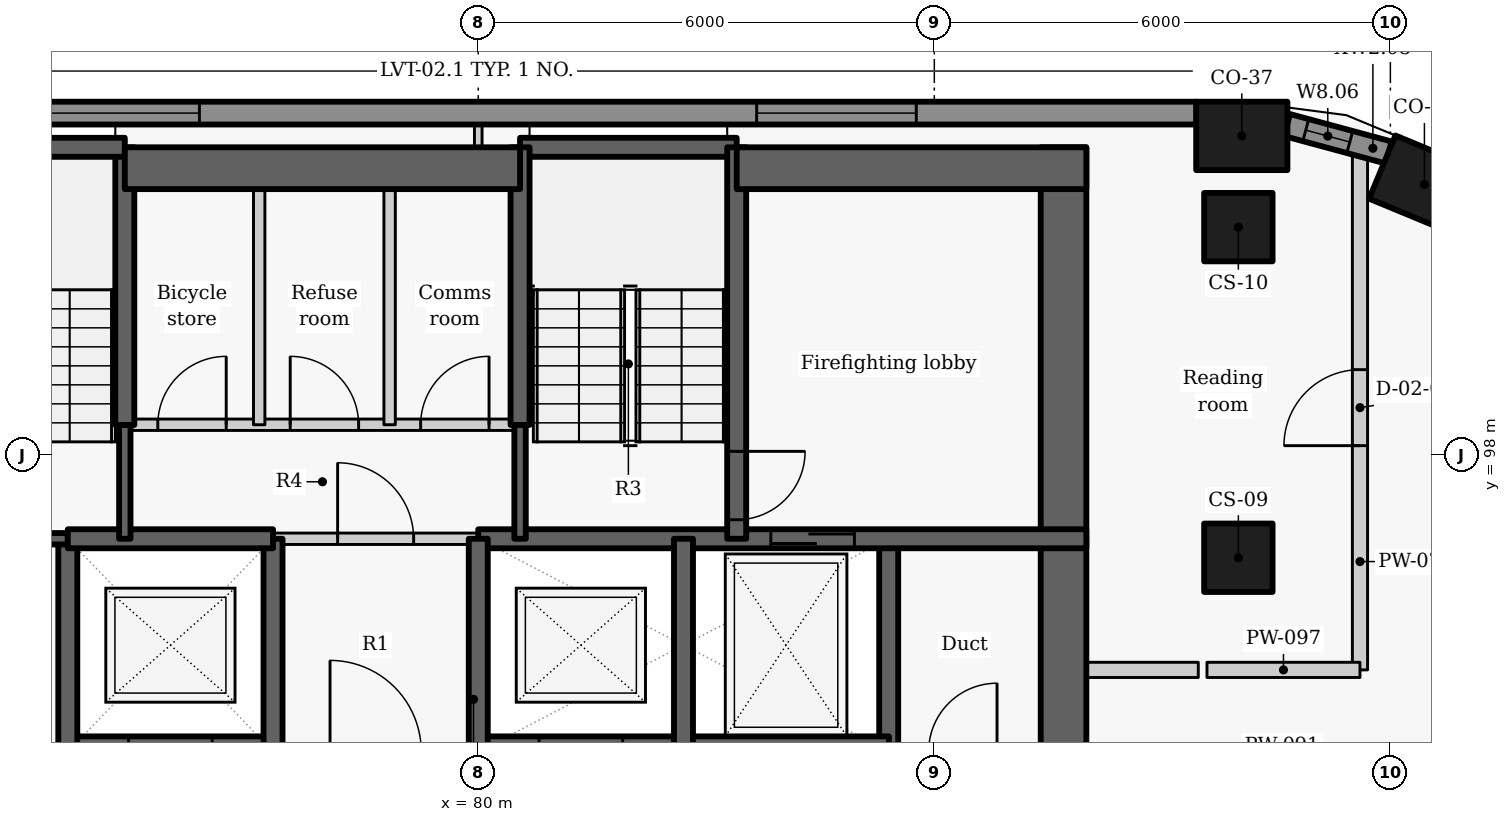
"""IFC4 building model, lengths in metres.
Left out: names, types, materials, properties, quantities, classifications, styles, units other than length and angle.
Written with IfcOpenShell. Run it as: python <this file> out.ifc"""

import sys

from ifc_helpers import new_model, si_unit, direction, frame, frame_2d, origin, origin_2d, place, context, subcontext, project, spatial, rectangle, extrude, element, fill, save


model = new_model("IFC4")
c1 = context("Model", 3, precision=1e-05, world=origin(), true_north=direction((0.0, 1.0)))
c2 = subcontext(c1, "Body", "Model", "MODEL_VIEW")
j1 = project(units=[si_unit("LENGTHUNIT", "METRE"), si_unit("PLANEANGLEUNIT", "RADIAN")], contexts=[c1])
p1 = place(None, origin())
s1 = spatial("IfcSite", under=j1, at=p1, CompositionType="ELEMENT")
p2 = place(p1, origin())
s2 = spatial("IfcBuilding", under=s1, at=p2, CompositionType="ELEMENT")
p3 = place(p2, frame((0.0, 0.0, 176.7)))
s3 = spatial("IfcBuildingStorey", under=s2, at=p3, CompositionType="ELEMENT", Elevation=176.7)
for number, where, z_axis, x_axis in (
    (1, (92.448, 101.56, 0.0), (0.0, 0.0, 1.0), (-0.924, 0.383, 0.0)),
    (2, (90.045, 102.2, 0.0), (0.0, 0.0, 1.0), (-1.0, 0.0, 0.0)),
):
    element("IfcColumn", number, at=place(p3, frame(where, z_axis=z_axis, x_axis=x_axis)), inside=s3, PredefinedType="COLUMN", context=c2, shape_type="SweptSolid", body=[
        extrude(rectangle(XDim=1.2, YDim=0.9, at=origin_2d()), origin(), (0.0, 0.0, 1.0), 3.3),
    ])
for number, where, z_axis, x_axis in (
    (3, (90.0, 96.65, 0.0), (0.0, 0.0, 1.0), (0.0, 1.0, 0.0)),
    (4, (90.0, 101.0, 0.0), (0.0, 0.0, 1.0), (0.0, 1.0, 0.0)),
):
    element("IfcColumn", number, at=place(p3, frame(where, z_axis=z_axis, x_axis=x_axis)), inside=s3, PredefinedType="COLUMN", context=c2, shape_type="SweptSolid", body=[
        extrude(rectangle(XDim=0.9, YDim=0.9, at=origin_2d()), origin(), (0.0, 0.0, 1.0), 3.3),
    ])
p4 = place(p3, frame((91.977, 101.981, 0.0), z_axis=(0.0, 0.0, 1.0), x_axis=(-0.965315341278, 0.261086751661, 0.0)))
e5 = element("IfcWall", 5, at=p4, inside=s3, PredefinedType="SOLIDWALL", context=c2, shape_type="SweptSolid", body=[
    extrude(rectangle(XDim=1.384, YDim=0.3, at=frame_2d((0.692, 0.0))), origin(), (0.0, 0.0, 1.0), 2.425),
])
p5 = place(p4, frame((0.529, 0.0, 0.9)))
e6 = element("IfcOpeningElement", 6, at=p5, cuts=e5, PredefinedType="OPENING", context=c2, shape_type="SweptSolid", body=[
    extrude(rectangle(XDim=0.6, YDim=1.1, at=frame_2d((0.3, 0.55))), frame((0.0, 0.16, 0.0), z_axis=(0.0, -1.0, 0.0), x_axis=(1.0, 0.0, 0.0)), (0.0, 0.0, 1.0), 0.32),
])
p6 = place(p3, frame((89.449, 102.5, 0.0), z_axis=(0.0, 0.0, 1.0), x_axis=(-1.0, 0.0, 0.0)))
e7 = element("IfcWall", 7, at=p6, inside=s3, PredefinedType="SOLIDWALL", context=c2, shape_type="SweptSolid", body=[
    extrude(rectangle(XDim=18.933, YDim=0.3, at=frame_2d((9.466, 0.0))), origin(), (0.0, 0.0, 1.0), 2.425),
])
p7 = place(p6, frame((3.687, 0.0, 0.9)))
e8 = element("IfcOpeningElement", 8, at=p7, cuts=e7, PredefinedType="OPENING", context=c2, shape_type="SweptSolid", body=[
    extrude(rectangle(XDim=2.1, YDim=1.1, at=frame_2d((1.05, 0.55))), frame((0.0, 0.16, 0.0), z_axis=(0.0, -1.0, 0.0), x_axis=(1.0, 0.0, 0.0)), (0.0, 0.0, 1.0), 0.32),
])
p8 = place(p6, frame((13.118, 0.0, 0.9)))
e9 = element("IfcOpeningElement", 9, at=p8, cuts=e7, PredefinedType="OPENING", context=c2, shape_type="SweptSolid", body=[
    extrude(rectangle(XDim=2.1, YDim=1.1, at=frame_2d((1.05, 0.55))), frame((0.0, 0.16, 0.0), z_axis=(0.0, -1.0, 0.0), x_axis=(1.0, 0.0, 0.0)), (0.0, 0.0, 1.0), 0.32),
])
p9 = place(p3, frame((85.4, 94.1, -0.41), z_axis=(0.0, 0.0, 1.0), x_axis=(0.0, 1.0, 0.0)))
e10 = element("IfcWall", 10, at=p9, inside=s3, PredefinedType="SHEAR", context=c2, shape_type="SweptSolid", body=[
    extrude(rectangle(XDim=2.8, YDim=0.25, at=frame_2d((1.4, 0.0))), origin(), (0.0, 0.0, 1.0), 3.435),
])
p10 = place(p3, frame((87.7, 102.05, -0.41), z_axis=(0.0, 0.0, 1.0), x_axis=(0.0, -1.0, 0.0)))
e11 = element("IfcWall", 11, at=p10, inside=s3, PredefinedType="SHEAR", context=c2, shape_type="SweptSolid", body=[
    extrude(rectangle(XDim=14.25, YDim=0.6, at=frame_2d((7.125, 0.0))), origin(), (0.0, 0.0, 1.0), 3.435),
])
p11 = place(p10, frame((8.898, 0.0, 0.41)))
e12 = element("IfcOpeningElement", 12, at=p11, cuts=e11, PredefinedType="OPENING", context=c2, shape_type="SweptSolid", body=[
    extrude(rectangle(XDim=1.5, YDim=2.1, at=frame_2d((0.75, 1.05))), frame((0.0, 0.31, 0.0), z_axis=(0.0, -1.0, 0.0), x_axis=(1.0, 0.0, 0.0)), (0.0, 0.0, 1.0), 0.62),
])
p12 = place(p3, frame((74.597, 94.1, -0.41), z_axis=(0.0, 0.0, 1.0), x_axis=(1.0, 0.0, 0.0)))
e13 = element("IfcWall", 13, at=p12, inside=s3, PredefinedType="SHEAR", context=c2, shape_type="SweptSolid", body=[
    extrude(rectangle(XDim=2.706, YDim=0.4, at=frame_2d((1.353, 0.0))), origin(), (0.0, 0.0, 1.0), 3.435),
])
p13 = place(p12, frame((0.803, 0.0, 0.41)))
e14 = element("IfcOpeningElement", 14, at=p13, cuts=e13, PredefinedType="OPENING", context=c2, shape_type="SweptSolid", body=[
    extrude(rectangle(XDim=1.1, YDim=2.1, at=frame_2d((0.55, 1.05))), frame((0.0, 0.21, 0.0), z_axis=(0.0, -1.0, 0.0), x_axis=(1.0, 0.0, 0.0)), (0.0, 0.0, 1.0), 0.42),
])
p14 = place(p3, frame((79.997, 94.1, -0.41), z_axis=(0.0, 0.0, 1.0), x_axis=(1.0, 0.0, 0.0)))
e15 = element("IfcWall", 15, at=p14, inside=s3, PredefinedType="SHEAR", context=c2, shape_type="SweptSolid", body=[
    extrude(rectangle(XDim=5.406, YDim=0.4, at=frame_2d((2.703, 0.0))), origin(), (0.0, 0.0, 1.0), 3.435),
])
p15 = place(p14, frame((0.803, 0.0, 0.41)))
e16 = element("IfcOpeningElement", 16, at=p15, cuts=e15, PredefinedType="OPENING", context=c2, shape_type="SweptSolid", body=[
    extrude(rectangle(XDim=1.1, YDim=2.1, at=frame_2d((0.55, 1.05))), frame((0.0, 0.21, 0.0), z_axis=(0.0, -1.0, 0.0), x_axis=(1.0, 0.0, 0.0)), (0.0, 0.0, 1.0), 0.42),
])
p16 = place(p3, frame((74.6, 94.1, -0.41), z_axis=(0.0, 0.0, 1.0), x_axis=(0.0, 1.0, 0.0)))
e17 = element("IfcWall", 17, at=p16, inside=s3, PredefinedType="SHEAR", context=c2, shape_type="SweptSolid", body=[
    extrude(rectangle(XDim=2.8, YDim=0.25, at=frame_2d((1.4, 0.0))), origin(), (0.0, 0.0, 1.0), 3.435),
])
p17 = place(p3, frame((74.6, 96.9, -0.41), z_axis=(0.0, 0.0, 1.0), x_axis=(-1.0, 0.0, 0.0)))
e18 = element("IfcWall", 18, at=p17, inside=s3, PredefinedType="SHEAR", context=c2, shape_type="SweptSolid", body=[
    extrude(rectangle(XDim=2.6, YDim=0.15, at=frame_2d((1.3, 0.0))), origin(), (0.0, 0.0, 1.0), 3.435),
])
p18 = place(p17, frame((0.37, 0.0, 0.41)))
e19 = element("IfcOpeningElement", 19, at=p18, cuts=e18, PredefinedType="OPENING", context=c2, shape_type="SweptSolid", body=[
    extrude(rectangle(XDim=1.1, YDim=2.1, at=frame_2d((0.55, 1.05))), frame((0.0, 0.085, 0.0), z_axis=(0.0, -1.0, 0.0), x_axis=(1.0, 0.0, 0.0)), (0.0, 0.0, 1.0), 0.17),
])
p19 = place(p3, frame((77.3, 94.1, -0.41), z_axis=(0.0, 0.0, 1.0), x_axis=(0.0, 1.0, 0.0)))
e20 = element("IfcWall", 20, at=p19, inside=s3, PredefinedType="SHEAR", context=c2, shape_type="SweptSolid", body=[
    extrude(rectangle(XDim=2.8, YDim=0.25, at=frame_2d((1.4, 0.0))), origin(), (0.0, 0.0, 1.0), 3.435),
])
p20 = place(p3, frame((74.6, 96.9, -0.41), z_axis=(0.0, 0.0, 1.0), x_axis=(1.0, 0.0, 0.0)))
e21 = element("IfcWall", 21, at=p20, inside=s3, PredefinedType="SHEAR", context=c2, shape_type="SweptSolid", body=[
    extrude(rectangle(XDim=2.7, YDim=0.25, at=frame_2d((1.35, 0.0))), origin(), (0.0, 0.0, 1.0), 3.435),
])
p21 = place(p3, frame((80.0, 96.9, -0.41), z_axis=(0.0, 0.0, 1.0), x_axis=(1.0, 0.0, 0.0)))
e22 = element("IfcWall", 22, at=p21, inside=s3, PredefinedType="SHEAR", context=c2, shape_type="SweptSolid", body=[
    extrude(rectangle(XDim=8.0, YDim=0.25, at=frame_2d((4.0, 0.0))), origin(), (0.0, 0.0, 1.0), 3.435),
])
p22 = place(p21, frame((3.849, 0.0, 0.41)))
e23 = element("IfcOpeningElement", 23, at=p22, cuts=e22, PredefinedType="OPENING", context=c2, shape_type="SweptSolid", body=[
    extrude(rectangle(XDim=1.1, YDim=2.1, at=frame_2d((0.55, 1.05))), frame((0.0, 0.135, 0.0), z_axis=(0.0, -1.0, 0.0), x_axis=(1.0, 0.0, 0.0)), (0.0, 0.0, 1.0), 0.27),
])
p23 = place(p3, frame((80.0, 94.1, -0.41), z_axis=(0.0, 0.0, 1.0), x_axis=(0.0, 1.0, 0.0)))
e24 = element("IfcWall", 24, at=p23, inside=s3, PredefinedType="SHEAR", context=c2, shape_type="SweptSolid", body=[
    extrude(rectangle(XDim=2.8, YDim=0.25, at=frame_2d((1.4, 0.0))), origin(), (0.0, 0.0, 1.0), 3.435),
])
p24 = place(p3, frame((77.3, 96.9, 0.0), z_axis=(0.0, 0.0, 1.0), x_axis=(1.0, 0.0, 0.0)))
e25 = element("IfcWall", 25, at=p24, inside=s3, PredefinedType="PARTITIONING", context=c2, shape_type="SweptSolid", body=[
    extrude(rectangle(XDim=2.7, YDim=0.15, at=frame_2d((1.35, 0.0))), origin(), (0.0, 0.0, 1.0), 3.025),
])
p25 = place(p24, frame((0.85, 0.0, 0.0)))
e26 = element("IfcOpeningElement", 26, at=p25, cuts=e25, PredefinedType="OPENING", context=c2, shape_type="SweptSolid", body=[
    extrude(rectangle(XDim=1.0, YDim=2.1, at=frame_2d((0.5, 1.05))), frame((0.0, 0.085, 0.0), z_axis=(0.0, -1.0, 0.0), x_axis=(1.0, 0.0, 0.0)), (0.0, 0.0, 1.0), 0.17),
])
p26 = place(p3, frame((82.7, 94.1, -0.41), z_axis=(0.0, 0.0, 1.0), x_axis=(0.0, 1.0, 0.0)))
e27 = element("IfcWall", 27, at=p26, inside=s3, PredefinedType="SHEAR", context=c2, shape_type="SweptSolid", body=[
    extrude(rectangle(XDim=2.8, YDim=0.25, at=frame_2d((1.4, 0.0))), origin(), (0.0, 0.0, 1.0), 3.435),
])
p27 = place(p3, frame((75.35, 96.9, -0.41), z_axis=(0.0, 0.0, 1.0), x_axis=(0.0, 1.0, 0.0)))
e28 = element("IfcWall", 28, at=p27, inside=s3, PredefinedType="SHEAR", context=c2, shape_type="SweptSolid", body=[
    extrude(rectangle(XDim=1.503, YDim=0.15, at=frame_2d((0.751, 0.0))), origin(), (0.0, 0.0, 1.0), 3.435),
])
p28 = place(p3, frame((75.35, 98.397, -0.41), z_axis=(0.0, 0.0, 1.0), x_axis=(0.0, 1.0, 0.0)))
e29 = element("IfcWall", 29, at=p28, inside=s3, PredefinedType="SHEAR", context=c2, shape_type="SweptSolid", body=[
    extrude(rectangle(XDim=3.653, YDim=0.25, at=frame_2d((1.827, 0.0))), origin(), (0.0, 0.0, 1.0), 3.435),
])
p29 = place(p3, frame((72.0, 102.05, 0.0), z_axis=(0.0, 0.0, 1.0), x_axis=(1.0, 0.0, 0.0)))
e30 = element("IfcWall", 30, at=p29, inside=s3, PredefinedType="SHEAR", context=c2, shape_type="SweptSolid", body=[
    extrude(rectangle(XDim=3.35, YDim=0.25, at=frame_2d((1.675, 0.0))), origin(), (0.0, 0.0, 1.0), 3.025),
])
p30 = place(p3, frame((80.55, 102.05, 0.0), z_axis=(0.0, 0.0, 1.0), x_axis=(1.0, 0.0, 0.0)))
e31 = element("IfcWall", 31, at=p30, inside=s3, PredefinedType="SHEAR", context=c2, shape_type="SweptSolid", body=[
    extrude(rectangle(XDim=2.85, YDim=0.25, at=frame_2d((1.425, 0.0))), origin(), (0.0, 0.0, 1.0), 3.025),
])
p31 = place(p3, frame((83.4, 102.05, -0.41), z_axis=(0.0, 0.0, 1.0), x_axis=(0.0, -1.0, 0.0)))
e32 = element("IfcWall", 32, at=p31, inside=s3, PredefinedType="SHEAR", context=c2, shape_type="SweptSolid", body=[
    extrude(rectangle(XDim=5.15, YDim=0.25, at=frame_2d((2.575, 0.0))), origin(), (0.0, 0.0, 1.0), 3.435),
])
p32 = place(p31, frame((4.0, 0.0, 0.41)))
e33 = element("IfcOpeningElement", 33, at=p32, cuts=e32, PredefinedType="OPENING", context=c2, shape_type="SweptSolid", body=[
    extrude(rectangle(XDim=0.9, YDim=2.1, at=frame_2d((0.45, 1.05))), frame((0.0, 0.135, 0.0), z_axis=(0.0, -1.0, 0.0), x_axis=(1.0, 0.0, 0.0)), (0.0, 0.0, 1.0), 0.27),
])
p33 = place(p3, frame((80.55, 96.9, -0.41), z_axis=(0.0, 0.0, 1.0), x_axis=(0.0, 1.0, 0.0)))
e34 = element("IfcWall", 34, at=p33, inside=s3, PredefinedType="SHEAR", context=c2, shape_type="SweptSolid", body=[
    extrude(rectangle(XDim=1.503, YDim=0.15, at=frame_2d((0.751, 0.0))), origin(), (0.0, 0.0, 1.0), 3.435),
])
p34 = place(p3, frame((80.55, 98.397, -0.41), z_axis=(0.0, 0.0, 1.0), x_axis=(0.0, 1.0, 0.0)))
e35 = element("IfcWall", 35, at=p34, inside=s3, PredefinedType="SHEAR", context=c2, shape_type="SweptSolid", body=[
    extrude(rectangle(XDim=3.653, YDim=0.25, at=frame_2d((1.827, 0.0))), origin(), (0.0, 0.0, 1.0), 3.435),
])
p35 = place(p3, frame((75.35, 101.775, 0.0), z_axis=(0.0, 0.0, 1.0), x_axis=(1.0, 0.0, 0.0)))
e36 = element("IfcWall", 36, at=p35, inside=s3, PredefinedType="SHEAR", context=c2, shape_type="SweptSolid", body=[
    extrude(rectangle(XDim=5.2, YDim=0.55, at=frame_2d((2.6, 0.0))), origin(), (0.0, 0.0, 1.0), 3.025),
])
p36 = place(p3, frame((83.4, 101.775, 0.0), z_axis=(0.0, 0.0, 1.0), x_axis=(1.0, 0.0, 0.0)))
e37 = element("IfcWall", 37, at=p36, inside=s3, PredefinedType="SHEAR", context=c2, shape_type="SweptSolid", body=[
    extrude(rectangle(XDim=4.6, YDim=0.55, at=frame_2d((2.3, 0.0))), origin(), (0.0, 0.0, 1.0), 3.025),
])
p37 = place(p3, frame((75.35, 98.4, 0.0), z_axis=(0.0, 0.0, 1.0), x_axis=(1.0, 0.0, 0.0)))
e38 = element("IfcWall", 38, at=p37, inside=s3, PredefinedType="PARTITIONING", context=c2, shape_type="SweptSolid", body=[
    extrude(rectangle(XDim=5.2, YDim=0.15, at=frame_2d((2.6, 0.0))), origin(), (0.0, 0.0, 1.0), 3.025),
])
p38 = place(p37, frame((0.434, 0.0, 0.0)))
e39 = element("IfcOpeningElement", 39, at=p38, cuts=e38, PredefinedType="OPENING", context=c2, shape_type="SweptSolid", body=[
    extrude(rectangle(XDim=0.9, YDim=2.1, at=frame_2d((0.45, 1.05))), frame((0.0, 0.085, 0.0), z_axis=(0.0, -1.0, 0.0), x_axis=(1.0, 0.0, 0.0)), (0.0, 0.0, 1.0), 0.17),
])
p39 = place(p37, frame((2.176, 0.0, 0.0)))
e40 = element("IfcOpeningElement", 40, at=p39, cuts=e38, PredefinedType="OPENING", context=c2, shape_type="SweptSolid", body=[
    extrude(rectangle(XDim=0.9, YDim=2.1, at=frame_2d((0.45, 1.05))), frame((0.0, 0.085, 0.0), z_axis=(0.0, -1.0, 0.0), x_axis=(1.0, 0.0, 0.0)), (0.0, 0.0, 1.0), 0.17),
])
p40 = place(p37, frame((3.892, 0.0, 0.0)))
e41 = element("IfcOpeningElement", 41, at=p40, cuts=e38, PredefinedType="OPENING", context=c2, shape_type="SweptSolid", body=[
    extrude(rectangle(XDim=0.9, YDim=2.1, at=frame_2d((0.45, 1.05))), frame((0.0, 0.085, 0.0), z_axis=(0.0, -1.0, 0.0), x_axis=(1.0, 0.0, 0.0)), (0.0, 0.0, 1.0), 0.17),
])
for number, where, z_axis, x_axis in (
    (42, (77.118, 98.4, 0.0), (0.0, 0.0, 1.0), (0.0, 1.0, 0.0)),
    (43, (78.834, 98.4, 0.0), (0.0, 0.0, 1.0), (0.0, 1.0, 0.0)),
):
    element("IfcWall", number, at=place(p3, frame(where, z_axis=z_axis, x_axis=x_axis)), inside=s3, PredefinedType="PARTITIONING", context=c2, shape_type="SweptSolid", body=[
        extrude(rectangle(XDim=3.65, YDim=0.15, at=frame_2d((1.825, 0.0))), origin(), (0.0, 0.0, 1.0), 3.025),
    ])
p41 = place(p3, frame((91.6, 95.175, 0.0), z_axis=(0.0, 0.0, 1.0), x_axis=(0.0, 1.0, 0.0)))
e44 = element("IfcWall", 44, at=p41, inside=s3, PredefinedType="PARTITIONING", context=c2, shape_type="SweptSolid", body=[
    extrude(rectangle(XDim=6.899, YDim=0.2, at=frame_2d((3.449, 0.0))), origin(), (0.0, 0.0, 1.0), 2.405),
])
p42 = place(p41, frame((2.95, 0.0, 0.0)))
e45 = element("IfcOpeningElement", 45, at=p42, cuts=e44, PredefinedType="OPENING", context=c2, shape_type="SweptSolid", body=[
    extrude(rectangle(XDim=1.0, YDim=2.1, at=frame_2d((0.5, 1.05))), frame((0.0, 0.11, 0.0), z_axis=(0.0, -1.0, 0.0), x_axis=(1.0, 0.0, 0.0)), (0.0, 0.0, 1.0), 0.22),
])
p43 = place(p3, frame((88.0, 95.175, 0.0), z_axis=(0.0, 0.0, 1.0), x_axis=(1.0, 0.0, 0.0)))
e46 = element("IfcWall", 46, at=p43, inside=s3, PredefinedType="PARTITIONING", context=c2, shape_type="SweptSolid", body=[
    extrude(rectangle(XDim=1.473, YDim=0.2, at=frame_2d((0.736, 0.0))), origin(), (0.0, 0.0, 1.0), 3.025),
])
p44 = place(p3, frame((89.587, 95.175, 0.0), z_axis=(0.0, 0.0, 1.0), x_axis=(1.0, 0.0, 0.0)))
e47 = element("IfcWall", 47, at=p44, inside=s3, PredefinedType="PARTITIONING", context=c2, shape_type="SweptSolid", body=[
    extrude(rectangle(XDim=2.013, YDim=0.2, at=frame_2d((1.006, 0.0))), origin(), (0.0, 0.0, 1.0), 2.505),
])
p45 = place(p3, frame((80.0, 102.05, 0.0), z_axis=(0.0, 0.0, 1.0), x_axis=(0.0, 1.0, 0.0)))
e48 = element("IfcWall", 48, at=p45, inside=s3, PredefinedType="PARTITIONING", context=c2, shape_type="SweptSolid", body=[
    extrude(rectangle(XDim=0.3, YDim=0.1, at=frame_2d((0.15, 0.0))), origin(), (0.0, 0.0, 1.0), 3.025),
])
p46 = place(p5, origin())
e49 = element("IfcWindow", 49, at=p46, inside=s3, PartitioningType="SINGLE_PANEL", PredefinedType="WINDOW", context=c2, shape_type="SweptSolid", body=[
    extrude(rectangle(XDim=0.6, YDim=1.1, at=frame_2d((0.3, 0.55))), frame((0.0, 0.03, 0.0), z_axis=(0.0, -1.0, 0.0), x_axis=(1.0, 0.0, 0.0)), (0.0, 0.0, 1.0), 0.06),
])
fill(e6, e49)
p47 = place(p7, origin())
e50 = element("IfcWindow", 50, at=p47, inside=s3, PartitioningType="SINGLE_PANEL", PredefinedType="WINDOW", context=c2, shape_type="SweptSolid", body=[
    extrude(rectangle(XDim=2.1, YDim=1.1, at=frame_2d((1.05, 0.55))), frame((0.0, 0.03, 0.0), z_axis=(0.0, -1.0, 0.0), x_axis=(1.0, 0.0, 0.0)), (0.0, 0.0, 1.0), 0.06),
])
fill(e8, e50)
p48 = place(p8, origin())
e51 = element("IfcWindow", 51, at=p48, inside=s3, PartitioningType="SINGLE_PANEL", PredefinedType="WINDOW", context=c2, shape_type="SweptSolid", body=[
    extrude(rectangle(XDim=2.1, YDim=1.1, at=frame_2d((1.05, 0.55))), frame((0.0, 0.03, 0.0), z_axis=(0.0, -1.0, 0.0), x_axis=(1.0, 0.0, 0.0)), (0.0, 0.0, 1.0), 0.06),
])
fill(e9, e51)
p49 = place(p22, origin())
e52 = element("IfcDoor", 52, at=p49, inside=s3, OperationType="SLIDING_TO_LEFT", PredefinedType="DOOR", context=c2, shape_type="SweptSolid", body=[
    extrude(rectangle(XDim=1.1, YDim=2.1, at=frame_2d((0.55, 1.05))), frame((0.0, 0.025, 0.0), z_axis=(0.0, -1.0, 0.0), x_axis=(1.0, 0.0, 0.0)), (0.0, 0.0, 1.0), 0.05),
])
fill(e23, e52)
p50 = place(p25, origin())
e53 = element("IfcDoor", 53, at=p50, inside=s3, OperationType="SINGLE_SWING_LEFT", PredefinedType="DOOR", context=c2, shape_type="SweptSolid", body=[
    extrude(rectangle(XDim=1.0, YDim=2.1, at=frame_2d((0.5, 1.05))), frame((0.0, 0.025, 0.0), z_axis=(0.0, -1.0, 0.0), x_axis=(1.0, 0.0, 0.0)), (0.0, 0.0, 1.0), 0.05),
])
fill(e26, e53)
p51 = place(p38, origin())
e54 = element("IfcDoor", 54, at=p51, inside=s3, OperationType="SINGLE_SWING_RIGHT", PredefinedType="DOOR", context=c2, shape_type="SweptSolid", body=[
    extrude(rectangle(XDim=0.9, YDim=2.1, at=frame_2d((0.45, 1.05))), frame((0.0, 0.025, 0.0), z_axis=(0.0, -1.0, 0.0), x_axis=(1.0, 0.0, 0.0)), (0.0, 0.0, 1.0), 0.05),
])
fill(e39, e54)
p52 = place(p39, origin())
e55 = element("IfcDoor", 55, at=p52, inside=s3, OperationType="SINGLE_SWING_LEFT", PredefinedType="DOOR", context=c2, shape_type="SweptSolid", body=[
    extrude(rectangle(XDim=0.9, YDim=2.1, at=frame_2d((0.45, 1.05))), frame((0.0, 0.025, 0.0), z_axis=(0.0, -1.0, 0.0), x_axis=(1.0, 0.0, 0.0)), (0.0, 0.0, 1.0), 0.05),
])
fill(e40, e55)
p53 = place(p40, origin())
e56 = element("IfcDoor", 56, at=p53, inside=s3, OperationType="SINGLE_SWING_RIGHT", PredefinedType="DOOR", context=c2, shape_type="SweptSolid", body=[
    extrude(rectangle(XDim=0.9, YDim=2.1, at=frame_2d((0.45, 1.05))), frame((0.0, 0.025, 0.0), z_axis=(0.0, -1.0, 0.0), x_axis=(1.0, 0.0, 0.0)), (0.0, 0.0, 1.0), 0.05),
])
fill(e41, e56)
p54 = place(p32, origin())
e57 = element("IfcDoor", 57, at=p54, inside=s3, OperationType="SINGLE_SWING_LEFT", PredefinedType="DOOR", context=c2, shape_type="SweptSolid", body=[
    extrude(rectangle(XDim=0.9, YDim=2.1, at=frame_2d((0.45, 1.05))), frame((0.0, 0.025, 0.0), z_axis=(0.0, -1.0, 0.0), x_axis=(1.0, 0.0, 0.0)), (0.0, 0.0, 1.0), 0.05),
])
fill(e33, e57)
p55 = place(p42, origin())
e58 = element("IfcDoor", 58, at=p55, inside=s3, OperationType="SINGLE_SWING_LEFT", PredefinedType="DOOR", context=c2, shape_type="SweptSolid", body=[
    extrude(rectangle(XDim=1.0, YDim=2.1, at=frame_2d((0.5, 1.05))), frame((0.0, 0.025, 0.0), z_axis=(0.0, -1.0, 0.0), x_axis=(1.0, 0.0, 0.0)), (0.0, 0.0, 1.0), 0.05),
])
fill(e45, e58)
save(model, sys.argv[1])
